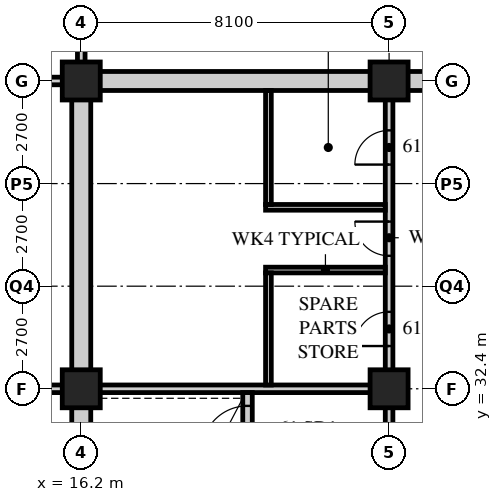
"""IFC4 building model, lengths in metres.
Left out: names, types, materials, properties, quantities, classifications, styles, units other than length and angle.
Written with IfcOpenShell. Run it as: python <this file> out.ifc"""

import sys

from ifc_helpers import new_model, si_unit, direction, frame, frame_2d, origin, origin_2d, place, context, subcontext, project, spatial, rectangle, hollow_rectangle, extrude, element, fill, save


model = new_model("IFC4")
c1 = context("Model", 3, precision=1e-05, world=origin(), true_north=direction((0.0, 1.0)))
c2 = subcontext(c1, "Body", "Model", "MODEL_VIEW")
j1 = project(units=[si_unit("LENGTHUNIT", "METRE"), si_unit("PLANEANGLEUNIT", "RADIAN")], contexts=[c1])
p1 = place(None, origin())
s1 = spatial("IfcSite", under=j1, at=p1, CompositionType="ELEMENT")
p2 = place(p1, origin())
s2 = spatial("IfcBuilding", under=s1, at=p2, CompositionType="ELEMENT")
p3 = place(p2, frame((0.0, 0.0, 235.2)))
s3 = spatial("IfcBuildingStorey", under=s2, at=p3, CompositionType="ELEMENT", Elevation=235.2)
for number, where, z_axis, x_axis in (
    (1, (16.2, 32.4, 0.0), (0.0, 0.0, 1.0), (1.0, 0.0, 0.0)),
    (2, (16.2, 40.5, 0.0), (0.0, 0.0, 1.0), (1.0, 0.0, 0.0)),
    (3, (24.3, 32.4, 0.0), (0.0, 0.0, 1.0), (1.0, 0.0, 0.0)),
    (4, (24.3, 40.5, 0.0), (0.0, 0.0, 1.0), (1.0, 0.0, 0.0)),
):
    element("IfcColumn", number, at=place(p3, frame(where, z_axis=z_axis, x_axis=x_axis)), inside=s3, PredefinedType="COLUMN", context=c2, shape_type="SweptSolid", body=[
        extrude(hollow_rectangle(XDim=1.0, YDim=1.0, WallThickness=0.1, at=origin_2d()), origin(), (0.0, 0.0, 1.0), 7.2),
    ])
p4 = place(p3, frame((9.9, 32.4, 0.0), z_axis=(0.0, 0.0, 1.0), x_axis=(1.0, 0.0, 0.0)))
e5 = element("IfcWall", 5, at=p4, inside=s3, PredefinedType="SOLIDWALL", context=c2, shape_type="SweptSolid", body=[
    extrude(rectangle(XDim=6.3, YDim=0.2, at=frame_2d((3.15, 0.0))), origin(), (0.0, 0.0, 1.0), 6.25),
])
p5 = place(p3, frame((16.2, 40.5, 0.0), z_axis=(0.0, 0.0, 1.0), x_axis=(0.0, 1.0, 0.0)))
e6 = element("IfcWall", 6, at=p5, inside=s3, PredefinedType="SOLIDWALL", context=c2, shape_type="SweptSolid", body=[
    extrude(rectangle(XDim=9.0, YDim=0.2, at=frame_2d((4.5, 0.0))), origin(), (0.0, 0.0, 1.0), 5.95),
])
p6 = place(p3, frame((9.9, 40.5, 0.0), z_axis=(0.0, 0.0, 1.0), x_axis=(1.0, 0.0, 0.0)))
e7 = element("IfcWall", 7, at=p6, inside=s3, PredefinedType="SOLIDWALL", context=c2, shape_type="SweptSolid", body=[
    extrude(rectangle(XDim=6.3, YDim=0.2, at=frame_2d((3.15, 0.0))), origin(), (0.0, 0.0, 1.0), 6.25),
])
p7 = place(p3, frame((15.95, 40.5, 0.0), z_axis=(0.0, 0.0, 1.0), x_axis=(1.0, 0.0, 0.0)))
e8 = element("IfcWall", 8, at=p7, inside=s3, PredefinedType="SOLIDWALL", context=c2, shape_type="SweptSolid", body=[
    extrude(rectangle(XDim=24.8, YDim=0.5, at=frame_2d((12.4, 0.0))), origin(), (0.0, 0.0, 1.0), 6.188),
])
p8 = place(p7, frame((11.5, 0.0, 0.0)))
e9 = element("IfcOpeningElement", 9, at=p8, cuts=e8, PredefinedType="OPENING", context=c2, shape_type="SweptSolid", body=[
    extrude(rectangle(XDim=1.8, YDim=2.4, at=frame_2d((0.9, 1.2))), frame((0.0, 0.26, 0.0), z_axis=(0.0, -1.0, 0.0), x_axis=(1.0, 0.0, 0.0)), (0.0, 0.0, 1.0), 0.52),
])
p9 = place(p3, frame((16.2, 24.55, 0.0), z_axis=(0.0, 0.0, 1.0), x_axis=(0.0, 1.0, 0.0)))
e10 = element("IfcWall", 10, at=p9, inside=s3, PredefinedType="SOLIDWALL", context=c2, shape_type="SweptSolid", body=[
    extrude(rectangle(XDim=15.7, YDim=0.5, at=frame_2d((7.85, 0.0))), origin(), (0.0, 0.0, 1.0), 5.95),
])
p10 = place(p3, frame((16.45, 32.4, 0.0), z_axis=(0.0, 0.0, 1.0), x_axis=(1.0, 0.0, 0.0)))
e11 = element("IfcWall", 11, at=p10, inside=s3, PredefinedType="SOLIDWALL", context=c2, shape_type="SweptSolid", body=[
    extrude(rectangle(XDim=7.95, YDim=0.2, at=frame_2d((3.975, 0.0))), origin(), (0.0, 0.0, 1.0), 6.25),
])
p11 = place(p3, frame((24.3, 24.55, 0.0), z_axis=(0.0, 0.0, 1.0), x_axis=(0.0, 1.0, 0.0)))
e12 = element("IfcWall", 12, at=p11, inside=s3, PredefinedType="SOLIDWALL", context=c2, shape_type="SweptSolid", body=[
    extrude(rectangle(XDim=7.75, YDim=0.2, at=frame_2d((3.875, 0.0))), origin(), (0.0, 0.0, 1.0), 6.25),
])
p12 = place(p11, frame((4.6, 0.0, 0.0)))
e13 = element("IfcOpeningElement", 13, at=p12, cuts=e12, PredefinedType="OPENING", context=c2, shape_type="SweptSolid", body=[
    extrude(rectangle(XDim=1.2, YDim=2.1, at=frame_2d((0.6, 1.05))), frame((0.0, 0.11, 0.0), z_axis=(0.0, -1.0, 0.0), x_axis=(1.0, 0.0, 0.0)), (0.0, 0.0, 1.0), 0.22),
])
p13 = place(p3, frame((20.575, 24.55, 0.0), z_axis=(0.0, 0.0, 1.0), x_axis=(0.0, 1.0, 0.0)))
e14 = element("IfcWall", 14, at=p13, inside=s3, PredefinedType="SOLIDWALL", context=c2, shape_type="SweptSolid", body=[
    extrude(rectangle(XDim=7.75, YDim=0.25, at=frame_2d((3.875, 0.0))), origin(), (0.0, 0.0, 1.0), 6.95),
])
p14 = place(p13, frame((6.2, 0.0, 0.0)))
e15 = element("IfcOpeningElement", 15, at=p14, cuts=e14, PredefinedType="OPENING", context=c2, shape_type="SweptSolid", body=[
    extrude(rectangle(XDim=1.2, YDim=2.1, at=frame_2d((0.6, 1.05))), frame((0.0, 0.135, 0.0), z_axis=(0.0, -1.0, 0.0), x_axis=(1.0, 0.0, 0.0)), (0.0, 0.0, 1.0), 0.27),
])
p15 = place(p3, frame((24.3, 32.5, 0.0), z_axis=(0.0, 0.0, 1.0), x_axis=(0.0, 1.0, 0.0)))
e16 = element("IfcWall", 16, at=p15, inside=s3, PredefinedType="PARTITIONING", context=c2, shape_type="SweptSolid", body=[
    extrude(rectangle(XDim=7.75, YDim=0.2, at=frame_2d((3.875, 0.0))), origin(), (0.0, 0.0, 1.0), 6.25),
])
p16 = place(p15, frame((1.025, 0.0, 0.0)))
e17 = element("IfcOpeningElement", 17, at=p16, cuts=e16, PredefinedType="OPENING", context=c2, shape_type="SweptSolid", body=[
    extrude(rectangle(XDim=0.9, YDim=2.1, at=frame_2d((0.45, 1.05))), frame((0.0, 0.11, 0.0), z_axis=(0.0, -1.0, 0.0), x_axis=(1.0, 0.0, 0.0)), (0.0, 0.0, 1.0), 0.22),
])
p17 = place(p15, frame((3.4, 0.0, 0.0)))
e18 = element("IfcOpeningElement", 18, at=p17, cuts=e16, PredefinedType="OPENING", context=c2, shape_type="SweptSolid", body=[
    extrude(rectangle(XDim=0.9, YDim=2.1, at=frame_2d((0.45, 1.05))), frame((0.0, 0.11, 0.0), z_axis=(0.0, -1.0, 0.0), x_axis=(1.0, 0.0, 0.0)), (0.0, 0.0, 1.0), 0.22),
])
p18 = place(p15, frame((5.8, 0.0, 0.0)))
e19 = element("IfcOpeningElement", 19, at=p18, cuts=e16, PredefinedType="OPENING", context=c2, shape_type="SweptSolid", body=[
    extrude(rectangle(XDim=0.9, YDim=2.1, at=frame_2d((0.45, 1.05))), frame((0.0, 0.11, 0.0), z_axis=(0.0, -1.0, 0.0), x_axis=(1.0, 0.0, 0.0)), (0.0, 0.0, 1.0), 0.22),
])
for number, where, z_axis, x_axis in (
    (20, (21.05, 35.525, 0.0), (0.0, 0.0, 1.0), (1.0, 0.0, 0.0)),
    (21, (21.05, 37.175, 0.0), (0.0, 0.0, 1.0), (1.0, 0.0, 0.0)),
):
    element("IfcWall", number, at=place(p3, frame(where, z_axis=z_axis, x_axis=x_axis)), inside=s3, PredefinedType="PARTITIONING", context=c2, shape_type="SweptSolid", body=[
        extrude(rectangle(XDim=3.15, YDim=0.15, at=frame_2d((1.575, 0.0))), origin(), (0.0, 0.0, 1.0), 6.95),
    ])
p19 = place(p3, frame((21.125, 32.5, 0.0), z_axis=(0.0, 0.0, 1.0), x_axis=(0.0, 1.0, 0.0)))
e22 = element("IfcWall", 22, at=p19, inside=s3, PredefinedType="PARTITIONING", context=c2, shape_type="SweptSolid", body=[
    extrude(rectangle(XDim=2.95, YDim=0.15, at=frame_2d((1.475, 0.0))), origin(), (0.0, 0.0, 1.0), 6.95),
])
p20 = place(p3, frame((21.125, 37.25, 0.0), z_axis=(0.0, 0.0, 1.0), x_axis=(0.0, 1.0, 0.0)))
e23 = element("IfcWall", 23, at=p20, inside=s3, PredefinedType="PARTITIONING", context=c2, shape_type="SweptSolid", body=[
    extrude(rectangle(XDim=3.0, YDim=0.15, at=frame_2d((1.5, 0.0))), origin(), (0.0, 0.0, 1.0), 6.95),
])
p21 = place(p16, origin())
e24 = element("IfcDoor", 24, at=p21, inside=s3, OperationType="SINGLE_SWING_LEFT", PredefinedType="DOOR", context=c2, shape_type="SweptSolid", body=[
    extrude(rectangle(XDim=0.9, YDim=2.1, at=frame_2d((0.45, 1.05))), frame((0.0, 0.025, 0.0), z_axis=(0.0, -1.0, 0.0), x_axis=(1.0, 0.0, 0.0)), (0.0, 0.0, 1.0), 0.05),
])
fill(e17, e24)
p22 = place(p17, origin())
e25 = element("IfcDoor", 25, at=p22, inside=s3, OperationType="SINGLE_SWING_RIGHT", PredefinedType="DOOR", context=c2, shape_type="SweptSolid", body=[
    extrude(rectangle(XDim=0.9, YDim=2.1, at=frame_2d((0.45, 1.05))), frame((0.0, 0.025, 0.0), z_axis=(0.0, -1.0, 0.0), x_axis=(1.0, 0.0, 0.0)), (0.0, 0.0, 1.0), 0.05),
])
fill(e18, e25)
p23 = place(p18, origin())
e26 = element("IfcDoor", 26, at=p23, inside=s3, OperationType="SINGLE_SWING_LEFT", PredefinedType="DOOR", context=c2, shape_type="SweptSolid", body=[
    extrude(rectangle(XDim=0.9, YDim=2.1, at=frame_2d((0.45, 1.05))), frame((0.0, 0.025, 0.0), z_axis=(0.0, -1.0, 0.0), x_axis=(1.0, 0.0, 0.0)), (0.0, 0.0, 1.0), 0.05),
])
fill(e19, e26)
p24 = place(p14, origin())
e27 = element("IfcDoor", 27, at=p24, inside=s3, OperationType="SINGLE_SWING_LEFT", PredefinedType="DOOR", context=c2, shape_type="SweptSolid", body=[
    extrude(rectangle(XDim=1.2, YDim=2.1, at=frame_2d((0.6, 1.05))), frame((0.0, 0.025, 0.0), z_axis=(0.0, -1.0, 0.0), x_axis=(1.0, 0.0, 0.0)), (0.0, 0.0, 1.0), 0.05),
])
fill(e15, e27)
save(model, sys.argv[1])
